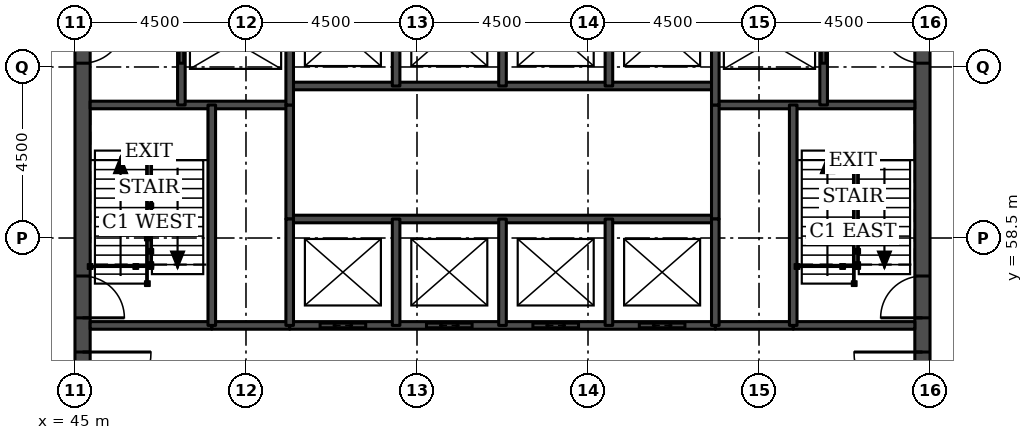
"""IFC4 building model, lengths in metres.
Left out: names, types, materials, properties, quantities, classifications, styles, units other than length and angle.
Written with IfcOpenShell. Run it as: python <this file> out.ifc"""

import sys

from ifc_helpers import new_model, si_unit, direction, frame, frame_2d, origin, place, context, subcontext, project, spatial, rectangle, extrude, element, fill, save


model = new_model("IFC4")
c1 = context("Model", 3, precision=1e-05, world=origin(), true_north=direction((0.0, 1.0)))
c2 = subcontext(c1, "Body", "Model", "MODEL_VIEW")
j1 = project(units=[si_unit("LENGTHUNIT", "METRE"), si_unit("PLANEANGLEUNIT", "RADIAN")], contexts=[c1])
p1 = place(None, origin())
s1 = spatial("IfcSite", under=j1, at=p1, CompositionType="ELEMENT")
p2 = place(p1, origin())
s2 = spatial("IfcBuilding", under=s1, at=p2, CompositionType="ELEMENT")
p3 = place(p2, frame((0.0, 0.0, 256.3)))
s3 = spatial("IfcBuildingStorey", under=s2, at=p3, CompositionType="ELEMENT", Elevation=256.3)
p4 = place(p3, frame((45.2, 49.5, 0.0), z_axis=(0.0, 0.0, 1.0), x_axis=(0.0, 1.0, 0.0)))
e1 = element("IfcWall", 1, at=p4, inside=s3, PredefinedType="SHEAR", context=c2, shape_type="SweptSolid", body=[
    extrude(rectangle(XDim=22.5, YDim=0.4, at=frame_2d((11.25, 0.0))), origin(), (0.0, 0.0, 1.0), 3.7),
])
p5 = place(p4, frame((4.2, 0.0, 0.0)))
e2 = element("IfcOpeningElement", 2, at=p5, cuts=e1, PredefinedType="OPENING", context=c2, shape_type="SweptSolid", body=[
    extrude(rectangle(XDim=1.8, YDim=2.1, at=frame_2d((0.9, 1.05))), frame((0.0, 0.21, 0.0), z_axis=(0.0, -1.0, 0.0), x_axis=(1.0, 0.0, 0.0)), (0.0, 0.0, 1.0), 0.42),
])
p6 = place(p4, frame((6.9, 0.0, 0.0)))
e3 = element("IfcOpeningElement", 3, at=p6, cuts=e1, PredefinedType="OPENING", context=c2, shape_type="SweptSolid", body=[
    extrude(rectangle(XDim=1.1, YDim=2.1, at=frame_2d((0.55, 1.05))), frame((0.0, 0.21, 0.0), z_axis=(0.0, -1.0, 0.0), x_axis=(1.0, 0.0, 0.0)), (0.0, 0.0, 1.0), 0.42),
])
p7 = place(p4, frame((13.6, 0.0, 0.0)))
e4 = element("IfcOpeningElement", 4, at=p7, cuts=e1, PredefinedType="OPENING", context=c2, shape_type="SweptSolid", body=[
    extrude(rectangle(XDim=1.1, YDim=2.1, at=frame_2d((0.55, 1.05))), frame((0.0, 0.21, 0.0), z_axis=(0.0, -1.0, 0.0), x_axis=(1.0, 0.0, 0.0)), (0.0, 0.0, 1.0), 0.42),
])
p8 = place(p4, frame((16.5, 0.0, 0.0)))
e5 = element("IfcOpeningElement", 5, at=p8, cuts=e1, PredefinedType="OPENING", context=c2, shape_type="SweptSolid", body=[
    extrude(rectangle(XDim=1.8, YDim=2.1, at=frame_2d((0.9, 1.05))), frame((0.0, 0.21, 0.0), z_axis=(0.0, -1.0, 0.0), x_axis=(1.0, 0.0, 0.0)), (0.0, 0.0, 1.0), 0.42),
])
p9 = place(p3, frame((67.3, 49.5, 0.0), z_axis=(0.0, 0.0, 1.0), x_axis=(0.0, 1.0, 0.0)))
e6 = element("IfcWall", 6, at=p9, inside=s3, PredefinedType="SHEAR", context=c2, shape_type="SweptSolid", body=[
    extrude(rectangle(XDim=22.5, YDim=0.4, at=frame_2d((11.25, 0.0))), origin(), (0.0, 0.0, 1.0), 3.7),
])
p10 = place(p9, frame((4.2, 0.0, 0.0)))
e7 = element("IfcOpeningElement", 7, at=p10, cuts=e6, PredefinedType="OPENING", context=c2, shape_type="SweptSolid", body=[
    extrude(rectangle(XDim=1.8, YDim=2.1, at=frame_2d((0.9, 1.05))), frame((0.0, 0.21, 0.0), z_axis=(0.0, -1.0, 0.0), x_axis=(1.0, 0.0, 0.0)), (0.0, 0.0, 1.0), 0.42),
])
p11 = place(p9, frame((6.9, 0.0, 0.0)))
e8 = element("IfcOpeningElement", 8, at=p11, cuts=e6, PredefinedType="OPENING", context=c2, shape_type="SweptSolid", body=[
    extrude(rectangle(XDim=1.1, YDim=2.1, at=frame_2d((0.55, 1.05))), frame((0.0, 0.21, 0.0), z_axis=(0.0, -1.0, 0.0), x_axis=(1.0, 0.0, 0.0)), (0.0, 0.0, 1.0), 0.42),
])
p12 = place(p9, frame((13.6, 0.0, 0.0)))
e9 = element("IfcOpeningElement", 9, at=p12, cuts=e6, PredefinedType="OPENING", context=c2, shape_type="SweptSolid", body=[
    extrude(rectangle(XDim=1.1, YDim=2.1, at=frame_2d((0.55, 1.05))), frame((0.0, 0.21, 0.0), z_axis=(0.0, -1.0, 0.0), x_axis=(1.0, 0.0, 0.0)), (0.0, 0.0, 1.0), 0.42),
])
p13 = place(p9, frame((16.5, 0.0, 0.0)))
e10 = element("IfcOpeningElement", 10, at=p13, cuts=e6, PredefinedType="OPENING", context=c2, shape_type="SweptSolid", body=[
    extrude(rectangle(XDim=1.8, YDim=2.1, at=frame_2d((0.9, 1.05))), frame((0.0, 0.21, 0.0), z_axis=(0.0, -1.0, 0.0), x_axis=(1.0, 0.0, 0.0)), (0.0, 0.0, 1.0), 0.42),
])
for number, where, z_axis, x_axis in (
    (11, (48.6, 56.2, 0.0), (0.0, 0.0, 1.0), (1.0, 0.0, 0.0)),
    (12, (61.85, 56.2, 0.0), (0.0, 0.0, 1.0), (1.0, 0.0, 0.0)),
):
    element("IfcWall", number, at=place(p3, frame(where, z_axis=z_axis, x_axis=x_axis)), inside=s3, PredefinedType="SOLIDWALL", context=c2, shape_type="SweptSolid", body=[
        extrude(rectangle(XDim=2.05, YDim=0.2, at=frame_2d((1.025, 0.0))), origin(), (0.0, 0.0, 1.0), 3.55),
    ])
p14 = place(p3, frame((45.4, 56.2, 0.0), z_axis=(0.0, 0.0, 1.0), x_axis=(1.0, 0.0, 0.0)))
e13 = element("IfcWall", 13, at=p14, inside=s3, PredefinedType="SOLIDWALL", context=c2, shape_type="SweptSolid", body=[
    extrude(rectangle(XDim=3.2, YDim=0.2, at=frame_2d((1.6, 0.0))), origin(), (0.0, 0.0, 1.0), 3.55),
])
p15 = place(p3, frame((50.65, 56.2, 0.0), z_axis=(0.0, 0.0, 1.0), x_axis=(1.0, 0.0, 0.0)))
e14 = element("IfcWall", 14, at=p15, inside=s3, PredefinedType="SOLIDWALL", context=c2, shape_type="SweptSolid", body=[
    extrude(rectangle(XDim=11.2, YDim=0.2, at=frame_2d((5.6, 0.0))), origin(), (0.0, 0.0, 1.0), 3.55),
])
p16 = place(p15, frame((0.8, 0.0, 0.0)))
e15 = element("IfcOpeningElement", 15, at=p16, cuts=e14, PredefinedType="OPENING", context=c2, shape_type="SweptSolid", body=[
    extrude(rectangle(XDim=1.2, YDim=2.1, at=frame_2d((0.6, 1.05))), frame((0.0, 0.11, 0.0), z_axis=(0.0, -1.0, 0.0), x_axis=(1.0, 0.0, 0.0)), (0.0, 0.0, 1.0), 0.22),
])
p17 = place(p15, frame((3.6, 0.0, 0.0)))
e16 = element("IfcOpeningElement", 16, at=p17, cuts=e14, PredefinedType="OPENING", context=c2, shape_type="SweptSolid", body=[
    extrude(rectangle(XDim=1.2, YDim=2.1, at=frame_2d((0.6, 1.05))), frame((0.0, 0.11, 0.0), z_axis=(0.0, -1.0, 0.0), x_axis=(1.0, 0.0, 0.0)), (0.0, 0.0, 1.0), 0.22),
])
p18 = place(p15, frame((6.4, 0.0, 0.0)))
e17 = element("IfcOpeningElement", 17, at=p18, cuts=e14, PredefinedType="OPENING", context=c2, shape_type="SweptSolid", body=[
    extrude(rectangle(XDim=1.2, YDim=2.1, at=frame_2d((0.6, 1.05))), frame((0.0, 0.11, 0.0), z_axis=(0.0, -1.0, 0.0), x_axis=(1.0, 0.0, 0.0)), (0.0, 0.0, 1.0), 0.22),
])
p19 = place(p15, frame((9.2, 0.0, 0.0)))
e18 = element("IfcOpeningElement", 18, at=p19, cuts=e14, PredefinedType="OPENING", context=c2, shape_type="SweptSolid", body=[
    extrude(rectangle(XDim=1.2, YDim=2.1, at=frame_2d((0.6, 1.05))), frame((0.0, 0.11, 0.0), z_axis=(0.0, -1.0, 0.0), x_axis=(1.0, 0.0, 0.0)), (0.0, 0.0, 1.0), 0.22),
])
p20 = place(p3, frame((63.9, 56.2, 0.0), z_axis=(0.0, 0.0, 1.0), x_axis=(1.0, 0.0, 0.0)))
e19 = element("IfcWall", 19, at=p20, inside=s3, PredefinedType="SOLIDWALL", context=c2, shape_type="SweptSolid", body=[
    extrude(rectangle(XDim=3.2, YDim=0.2, at=frame_2d((1.6, 0.0))), origin(), (0.0, 0.0, 1.0), 3.55),
])
p21 = place(p3, frame((50.65, 59.0, 0.0), z_axis=(0.0, 0.0, 1.0), x_axis=(1.0, 0.0, 0.0)))
e20 = element("IfcWall", 20, at=p21, inside=s3, PredefinedType="SOLIDWALL", context=c2, shape_type="SweptSolid", body=[
    extrude(rectangle(XDim=11.2, YDim=0.2, at=frame_2d((5.6, 0.0))), origin(), (0.0, 0.0, 1.0), 3.7),
])
for number, where, z_axis, x_axis in (
    (21, (45.4, 62.0, 0.0), (0.0, 0.0, 1.0), (1.0, 0.0, 0.0)),
    (22, (61.85, 62.0, 0.0), (0.0, 0.0, 1.0), (1.0, 0.0, 0.0)),
):
    element("IfcWall", number, at=place(p3, frame(where, z_axis=z_axis, x_axis=x_axis)), inside=s3, PredefinedType="SOLIDWALL", context=c2, shape_type="SweptSolid", body=[
        extrude(rectangle(XDim=5.25, YDim=0.2, at=frame_2d((2.625, 0.0))), origin(), (0.0, 0.0, 1.0), 3.55),
    ])
p22 = place(p3, frame((50.65, 62.5, 0.0), z_axis=(0.0, 0.0, 1.0), x_axis=(1.0, 0.0, 0.0)))
e23 = element("IfcWall", 23, at=p22, inside=s3, PredefinedType="SOLIDWALL", context=c2, shape_type="SweptSolid", body=[
    extrude(rectangle(XDim=11.2, YDim=0.2, at=frame_2d((5.6, 0.0))), origin(), (0.0, 0.0, 1.0), 3.7),
])
p23 = place(p3, frame((47.8, 62.0, 0.0), z_axis=(0.0, 0.0, 1.0), x_axis=(0.0, 1.0, 0.0)))
e24 = element("IfcWall", 24, at=p23, inside=s3, PredefinedType="SOLIDWALL", context=c2, shape_type="SweptSolid", body=[
    extrude(rectangle(XDim=3.3, YDim=0.2, at=frame_2d((1.65, 0.0))), origin(), (0.0, 0.0, 1.0), 3.55),
])
p24 = place(p23, frame((1.1, 0.0, 0.0)))
e25 = element("IfcOpeningElement", 25, at=p24, cuts=e24, PredefinedType="OPENING", context=c2, shape_type="SweptSolid", body=[
    extrude(rectangle(XDim=1.1, YDim=2.1, at=frame_2d((0.55, 1.05))), frame((0.0, 0.11, 0.0), z_axis=(0.0, -1.0, 0.0), x_axis=(1.0, 0.0, 0.0)), (0.0, 0.0, 1.0), 0.22),
])
p25 = place(p3, frame((48.6, 56.2, 0.0), z_axis=(0.0, 0.0, 1.0), x_axis=(0.0, 1.0, 0.0)))
e26 = element("IfcWall", 26, at=p25, inside=s3, PredefinedType="SOLIDWALL", context=c2, shape_type="SweptSolid", body=[
    extrude(rectangle(XDim=5.8, YDim=0.2, at=frame_2d((2.9, 0.0))), origin(), (0.0, 0.0, 1.0), 3.55),
])
p26 = place(p3, frame((50.65, 59.0, 0.0), z_axis=(0.0, 0.0, 1.0), x_axis=(0.0, 1.0, 0.0)))
e27 = element("IfcWall", 27, at=p26, inside=s3, PredefinedType="SOLIDWALL", context=c2, shape_type="SweptSolid", body=[
    extrude(rectangle(XDim=3.0, YDim=0.2, at=frame_2d((1.5, 0.0))), origin(), (0.0, 0.0, 1.0), 3.7),
])
p27 = place(p3, frame((50.65, 56.2, 0.0), z_axis=(0.0, 0.0, 1.0), x_axis=(0.0, 1.0, 0.0)))
e28 = element("IfcWall", 28, at=p27, inside=s3, PredefinedType="SOLIDWALL", context=c2, shape_type="SweptSolid", body=[
    extrude(rectangle(XDim=2.8, YDim=0.2, at=frame_2d((1.4, 0.0))), origin(), (0.0, 0.0, 1.0), 3.55),
])
p28 = place(p3, frame((50.65, 62.0, 0.0), z_axis=(0.0, 0.0, 1.0), x_axis=(0.0, 1.0, 0.0)))
e29 = element("IfcWall", 29, at=p28, inside=s3, PredefinedType="SOLIDWALL", context=c2, shape_type="SweptSolid", body=[
    extrude(rectangle(XDim=3.3, YDim=0.2, at=frame_2d((1.65, 0.0))), origin(), (0.0, 0.0, 1.0), 3.55),
])
for number, where, z_axis, x_axis in (
    (30, (53.45, 56.2, 0.0), (0.0, 0.0, 1.0), (0.0, 1.0, 0.0)),
    (31, (53.45, 62.5, 0.0), (0.0, 0.0, 1.0), (0.0, 1.0, 0.0)),
    (32, (56.25, 56.2, 0.0), (0.0, 0.0, 1.0), (0.0, 1.0, 0.0)),
    (33, (56.25, 62.5, 0.0), (0.0, 0.0, 1.0), (0.0, 1.0, 0.0)),
    (34, (59.05, 56.2, 0.0), (0.0, 0.0, 1.0), (0.0, 1.0, 0.0)),
    (35, (59.05, 62.5, 0.0), (0.0, 0.0, 1.0), (0.0, 1.0, 0.0)),
):
    element("IfcWall", number, at=place(p3, frame(where, z_axis=z_axis, x_axis=x_axis)), inside=s3, PredefinedType="SOLIDWALL", context=c2, shape_type="SweptSolid", body=[
        extrude(rectangle(XDim=2.8, YDim=0.2, at=frame_2d((1.4, 0.0))), origin(), (0.0, 0.0, 1.0), 3.55),
    ])
p29 = place(p3, frame((61.85, 59.0, 0.0), z_axis=(0.0, 0.0, 1.0), x_axis=(0.0, 1.0, 0.0)))
e36 = element("IfcWall", 36, at=p29, inside=s3, PredefinedType="SOLIDWALL", context=c2, shape_type="SweptSolid", body=[
    extrude(rectangle(XDim=3.0, YDim=0.2, at=frame_2d((1.5, 0.0))), origin(), (0.0, 0.0, 1.0), 3.7),
])
p30 = place(p3, frame((61.85, 56.2, 0.0), z_axis=(0.0, 0.0, 1.0), x_axis=(0.0, 1.0, 0.0)))
e37 = element("IfcWall", 37, at=p30, inside=s3, PredefinedType="SOLIDWALL", context=c2, shape_type="SweptSolid", body=[
    extrude(rectangle(XDim=2.8, YDim=0.2, at=frame_2d((1.4, 0.0))), origin(), (0.0, 0.0, 1.0), 3.55),
])
p31 = place(p3, frame((61.85, 62.0, 0.0), z_axis=(0.0, 0.0, 1.0), x_axis=(0.0, 1.0, 0.0)))
e38 = element("IfcWall", 38, at=p31, inside=s3, PredefinedType="SOLIDWALL", context=c2, shape_type="SweptSolid", body=[
    extrude(rectangle(XDim=3.3, YDim=0.2, at=frame_2d((1.65, 0.0))), origin(), (0.0, 0.0, 1.0), 3.55),
])
p32 = place(p3, frame((63.9, 56.2, 0.0), z_axis=(0.0, 0.0, 1.0), x_axis=(0.0, 1.0, 0.0)))
e39 = element("IfcWall", 39, at=p32, inside=s3, PredefinedType="SOLIDWALL", context=c2, shape_type="SweptSolid", body=[
    extrude(rectangle(XDim=5.8, YDim=0.2, at=frame_2d((2.9, 0.0))), origin(), (0.0, 0.0, 1.0), 3.55),
])
p33 = place(p3, frame((64.7, 62.0, 0.0), z_axis=(0.0, 0.0, 1.0), x_axis=(0.0, 1.0, 0.0)))
e40 = element("IfcWall", 40, at=p33, inside=s3, PredefinedType="SOLIDWALL", context=c2, shape_type="SweptSolid", body=[
    extrude(rectangle(XDim=3.3, YDim=0.2, at=frame_2d((1.65, 0.0))), origin(), (0.0, 0.0, 1.0), 3.55),
])
p34 = place(p33, frame((1.1, 0.0, 0.0)))
e41 = element("IfcOpeningElement", 41, at=p34, cuts=e40, PredefinedType="OPENING", context=c2, shape_type="SweptSolid", body=[
    extrude(rectangle(XDim=1.1, YDim=2.1, at=frame_2d((0.55, 1.05))), frame((0.0, 0.11, 0.0), z_axis=(0.0, -1.0, 0.0), x_axis=(1.0, 0.0, 0.0)), (0.0, 0.0, 1.0), 0.22),
])
p35 = place(p16, origin())
e42 = element("IfcDoor", 42, at=p35, inside=s3, OperationType="DOUBLE_DOOR_SLIDING", PredefinedType="DOOR", context=c2, shape_type="SweptSolid", body=[
    extrude(rectangle(XDim=1.2, YDim=2.1, at=frame_2d((0.6, 1.05))), frame((0.0, 0.025, 0.0), z_axis=(0.0, -1.0, 0.0), x_axis=(1.0, 0.0, 0.0)), (0.0, 0.0, 1.0), 0.05),
])
fill(e15, e42)
p36 = place(p17, origin())
e43 = element("IfcDoor", 43, at=p36, inside=s3, OperationType="DOUBLE_DOOR_SLIDING", PredefinedType="DOOR", context=c2, shape_type="SweptSolid", body=[
    extrude(rectangle(XDim=1.2, YDim=2.1, at=frame_2d((0.6, 1.05))), frame((0.0, 0.025, 0.0), z_axis=(0.0, -1.0, 0.0), x_axis=(1.0, 0.0, 0.0)), (0.0, 0.0, 1.0), 0.05),
])
fill(e16, e43)
p37 = place(p18, origin())
e44 = element("IfcDoor", 44, at=p37, inside=s3, OperationType="DOUBLE_DOOR_SLIDING", PredefinedType="DOOR", context=c2, shape_type="SweptSolid", body=[
    extrude(rectangle(XDim=1.2, YDim=2.1, at=frame_2d((0.6, 1.05))), frame((0.0, 0.025, 0.0), z_axis=(0.0, -1.0, 0.0), x_axis=(1.0, 0.0, 0.0)), (0.0, 0.0, 1.0), 0.05),
])
fill(e17, e44)
p38 = place(p19, origin())
e45 = element("IfcDoor", 45, at=p38, inside=s3, OperationType="DOUBLE_DOOR_SLIDING", PredefinedType="DOOR", context=c2, shape_type="SweptSolid", body=[
    extrude(rectangle(XDim=1.2, YDim=2.1, at=frame_2d((0.6, 1.05))), frame((0.0, 0.025, 0.0), z_axis=(0.0, -1.0, 0.0), x_axis=(1.0, 0.0, 0.0)), (0.0, 0.0, 1.0), 0.05),
])
fill(e18, e45)
p39 = place(p24, origin())
e46 = element("IfcDoor", 46, at=p39, inside=s3, OperationType="DOUBLE_DOOR_SLIDING", PredefinedType="DOOR", context=c2, shape_type="SweptSolid", body=[
    extrude(rectangle(XDim=1.1, YDim=2.1, at=frame_2d((0.55, 1.05))), frame((0.0, 0.025, 0.0), z_axis=(0.0, -1.0, 0.0), x_axis=(1.0, 0.0, 0.0)), (0.0, 0.0, 1.0), 0.05),
])
fill(e25, e46)
p40 = place(p34, origin())
e47 = element("IfcDoor", 47, at=p40, inside=s3, OperationType="DOUBLE_DOOR_SLIDING", PredefinedType="DOOR", context=c2, shape_type="SweptSolid", body=[
    extrude(rectangle(XDim=1.1, YDim=2.1, at=frame_2d((0.55, 1.05))), frame((0.0, 0.025, 0.0), z_axis=(0.0, -1.0, 0.0), x_axis=(1.0, 0.0, 0.0)), (0.0, 0.0, 1.0), 0.05),
])
fill(e41, e47)
p41 = place(p5, frame((1.8, 0.0, 0.0), z_axis=(0.0, 0.0, 1.0), x_axis=(-1.0, 0.0, 0.0)))
e48 = element("IfcDoor", 48, at=p41, inside=s3, OperationType="SINGLE_SWING_LEFT", PredefinedType="DOOR", context=c2, shape_type="SweptSolid", body=[
    extrude(rectangle(XDim=1.8, YDim=2.1, at=frame_2d((0.9, 1.05))), frame((0.0, 0.025, 0.0), z_axis=(0.0, -1.0, 0.0), x_axis=(1.0, 0.0, 0.0)), (0.0, 0.0, 1.0), 0.05),
])
fill(e2, e48)
p42 = place(p6, frame((1.1, 0.0, 0.0), z_axis=(0.0, 0.0, 1.0), x_axis=(-1.0, 0.0, 0.0)))
e49 = element("IfcDoor", 49, at=p42, inside=s3, OperationType="SINGLE_SWING_RIGHT", PredefinedType="DOOR", context=c2, shape_type="SweptSolid", body=[
    extrude(rectangle(XDim=1.1, YDim=2.1, at=frame_2d((0.55, 1.05))), frame((0.0, 0.025, 0.0), z_axis=(0.0, -1.0, 0.0), x_axis=(1.0, 0.0, 0.0)), (0.0, 0.0, 1.0), 0.05),
])
fill(e3, e49)
p43 = place(p7, frame((1.1, 0.0, 0.0), z_axis=(0.0, 0.0, 1.0), x_axis=(-1.0, 0.0, 0.0)))
e50 = element("IfcDoor", 50, at=p43, inside=s3, OperationType="SINGLE_SWING_LEFT", PredefinedType="DOOR", context=c2, shape_type="SweptSolid", body=[
    extrude(rectangle(XDim=1.1, YDim=2.1, at=frame_2d((0.55, 1.05))), frame((0.0, 0.025, 0.0), z_axis=(0.0, -1.0, 0.0), x_axis=(1.0, 0.0, 0.0)), (0.0, 0.0, 1.0), 0.05),
])
fill(e4, e50)
p44 = place(p10, origin())
e51 = element("IfcDoor", 51, at=p44, inside=s3, OperationType="SINGLE_SWING_RIGHT", PredefinedType="DOOR", context=c2, shape_type="SweptSolid", body=[
    extrude(rectangle(XDim=1.8, YDim=2.1, at=frame_2d((0.9, 1.05))), frame((0.0, 0.025, 0.0), z_axis=(0.0, -1.0, 0.0), x_axis=(1.0, 0.0, 0.0)), (0.0, 0.0, 1.0), 0.05),
])
fill(e7, e51)
p45 = place(p11, origin())
e52 = element("IfcDoor", 52, at=p45, inside=s3, OperationType="SINGLE_SWING_LEFT", PredefinedType="DOOR", context=c2, shape_type="SweptSolid", body=[
    extrude(rectangle(XDim=1.1, YDim=2.1, at=frame_2d((0.55, 1.05))), frame((0.0, 0.025, 0.0), z_axis=(0.0, -1.0, 0.0), x_axis=(1.0, 0.0, 0.0)), (0.0, 0.0, 1.0), 0.05),
])
fill(e8, e52)
p46 = place(p12, origin())
e53 = element("IfcDoor", 53, at=p46, inside=s3, OperationType="SINGLE_SWING_RIGHT", PredefinedType="DOOR", context=c2, shape_type="SweptSolid", body=[
    extrude(rectangle(XDim=1.1, YDim=2.1, at=frame_2d((0.55, 1.05))), frame((0.0, 0.025, 0.0), z_axis=(0.0, -1.0, 0.0), x_axis=(1.0, 0.0, 0.0)), (0.0, 0.0, 1.0), 0.05),
])
fill(e9, e53)
save(model, sys.argv[1])
